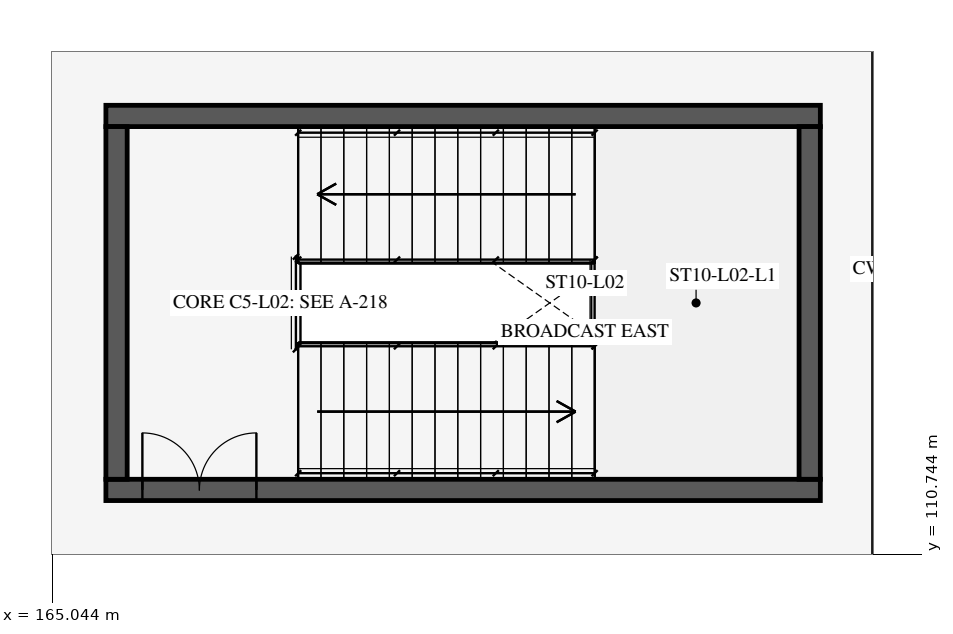
"""IFC4 building model, lengths in metres.
Left out: names, types, materials, properties, quantities, classifications, styles, units other than length and angle.
Written with IfcOpenShell. Run it as: python <this file> out.ifc"""

import sys

from ifc_helpers import new_model, si_unit, direction, frame, frame_2d, origin, place, context, subcontext, project, spatial, rectangle, extrude, element, fill, save


model = new_model("IFC4")
c1 = context("Model", 3, precision=1e-05, world=origin(), true_north=direction((0.0, 1.0)))
c2 = subcontext(c1, "Body", "Model", "MODEL_VIEW")
j1 = project(units=[si_unit("LENGTHUNIT", "METRE"), si_unit("PLANEANGLEUNIT", "RADIAN")], contexts=[c1])
p1 = place(None, origin())
s1 = spatial("IfcSite", under=j1, at=p1, CompositionType="ELEMENT")
p2 = place(p1, origin())
s2 = spatial("IfcBuilding", under=s1, at=p2, CompositionType="ELEMENT")
p3 = place(p2, frame((0.0, 0.0, 10.2)))
s3 = spatial("IfcBuildingStorey", under=s2, at=p3, CompositionType="ELEMENT", Elevation=10.2)
p4 = place(p3, frame((165.75, 111.59, 0.0), z_axis=(0.0, 0.0, 1.0), x_axis=(1.0, 0.0, 0.0)))
e1 = element("IfcWall", 1, at=p4, inside=s3, PredefinedType="SHEAR", context=c2, shape_type="SweptSolid", body=[
    extrude(rectangle(XDim=9.4, YDim=0.28, at=frame_2d((4.7, 0.0))), origin(), (0.0, 0.0, 1.0), 4.38),
])
p5 = place(p4, frame((0.48, 0.0, 0.0)))
e2 = element("IfcOpeningElement", 2, at=p5, cuts=e1, PredefinedType="OPENING", context=c2, shape_type="SweptSolid", body=[
    extrude(rectangle(XDim=1.5, YDim=2.3, at=frame_2d((0.75, 1.15))), frame((0.0, 0.152, 0.0), z_axis=(0.0, -1.0, 0.0), x_axis=(1.0, 0.0, 0.0)), (0.0, 0.0, 1.0), 0.304),
])
p6 = place(p3, frame((165.75, 116.51, 0.0), z_axis=(0.0, 0.0, 1.0), x_axis=(1.0, 0.0, 0.0)))
e3 = element("IfcWall", 3, at=p6, inside=s3, PredefinedType="SHEAR", context=c2, shape_type="SweptSolid", body=[
    extrude(rectangle(XDim=9.4, YDim=0.28, at=frame_2d((4.7, 0.0))), origin(), (0.0, 0.0, 1.0), 4.38),
])
for number, where, z_axis, x_axis in (
    (4, (165.89, 111.73, 0.0), (0.0, 0.0, 1.0), (0.0, 1.0, 0.0)),
    (5, (175.01, 111.73, 0.0), (0.0, 0.0, 1.0), (0.0, 1.0, 0.0)),
):
    element("IfcWall", number, at=place(p3, frame(where, z_axis=z_axis, x_axis=x_axis)), inside=s3, PredefinedType="SHEAR", context=c2, shape_type="SweptSolid", body=[
        extrude(rectangle(XDim=4.64, YDim=0.28, at=frame_2d((2.32, 0.0))), origin(), (0.0, 0.0, 1.0), 4.38),
    ])
p7 = place(p5, origin())
e6 = element("IfcDoor", 6, at=p7, inside=s3, OperationType="DOUBLE_DOOR_SINGLE_SWING", PredefinedType="DOOR", context=c2, shape_type="SweptSolid", body=[
    extrude(rectangle(XDim=1.5, YDim=2.3, at=frame_2d((0.75, 1.15))), frame((0.0, 0.025, 0.0), z_axis=(0.0, -1.0, 0.0), x_axis=(1.0, 0.0, 0.0)), (0.0, 0.0, 1.0), 0.05),
])
fill(e2, e6)
save(model, sys.argv[1])
